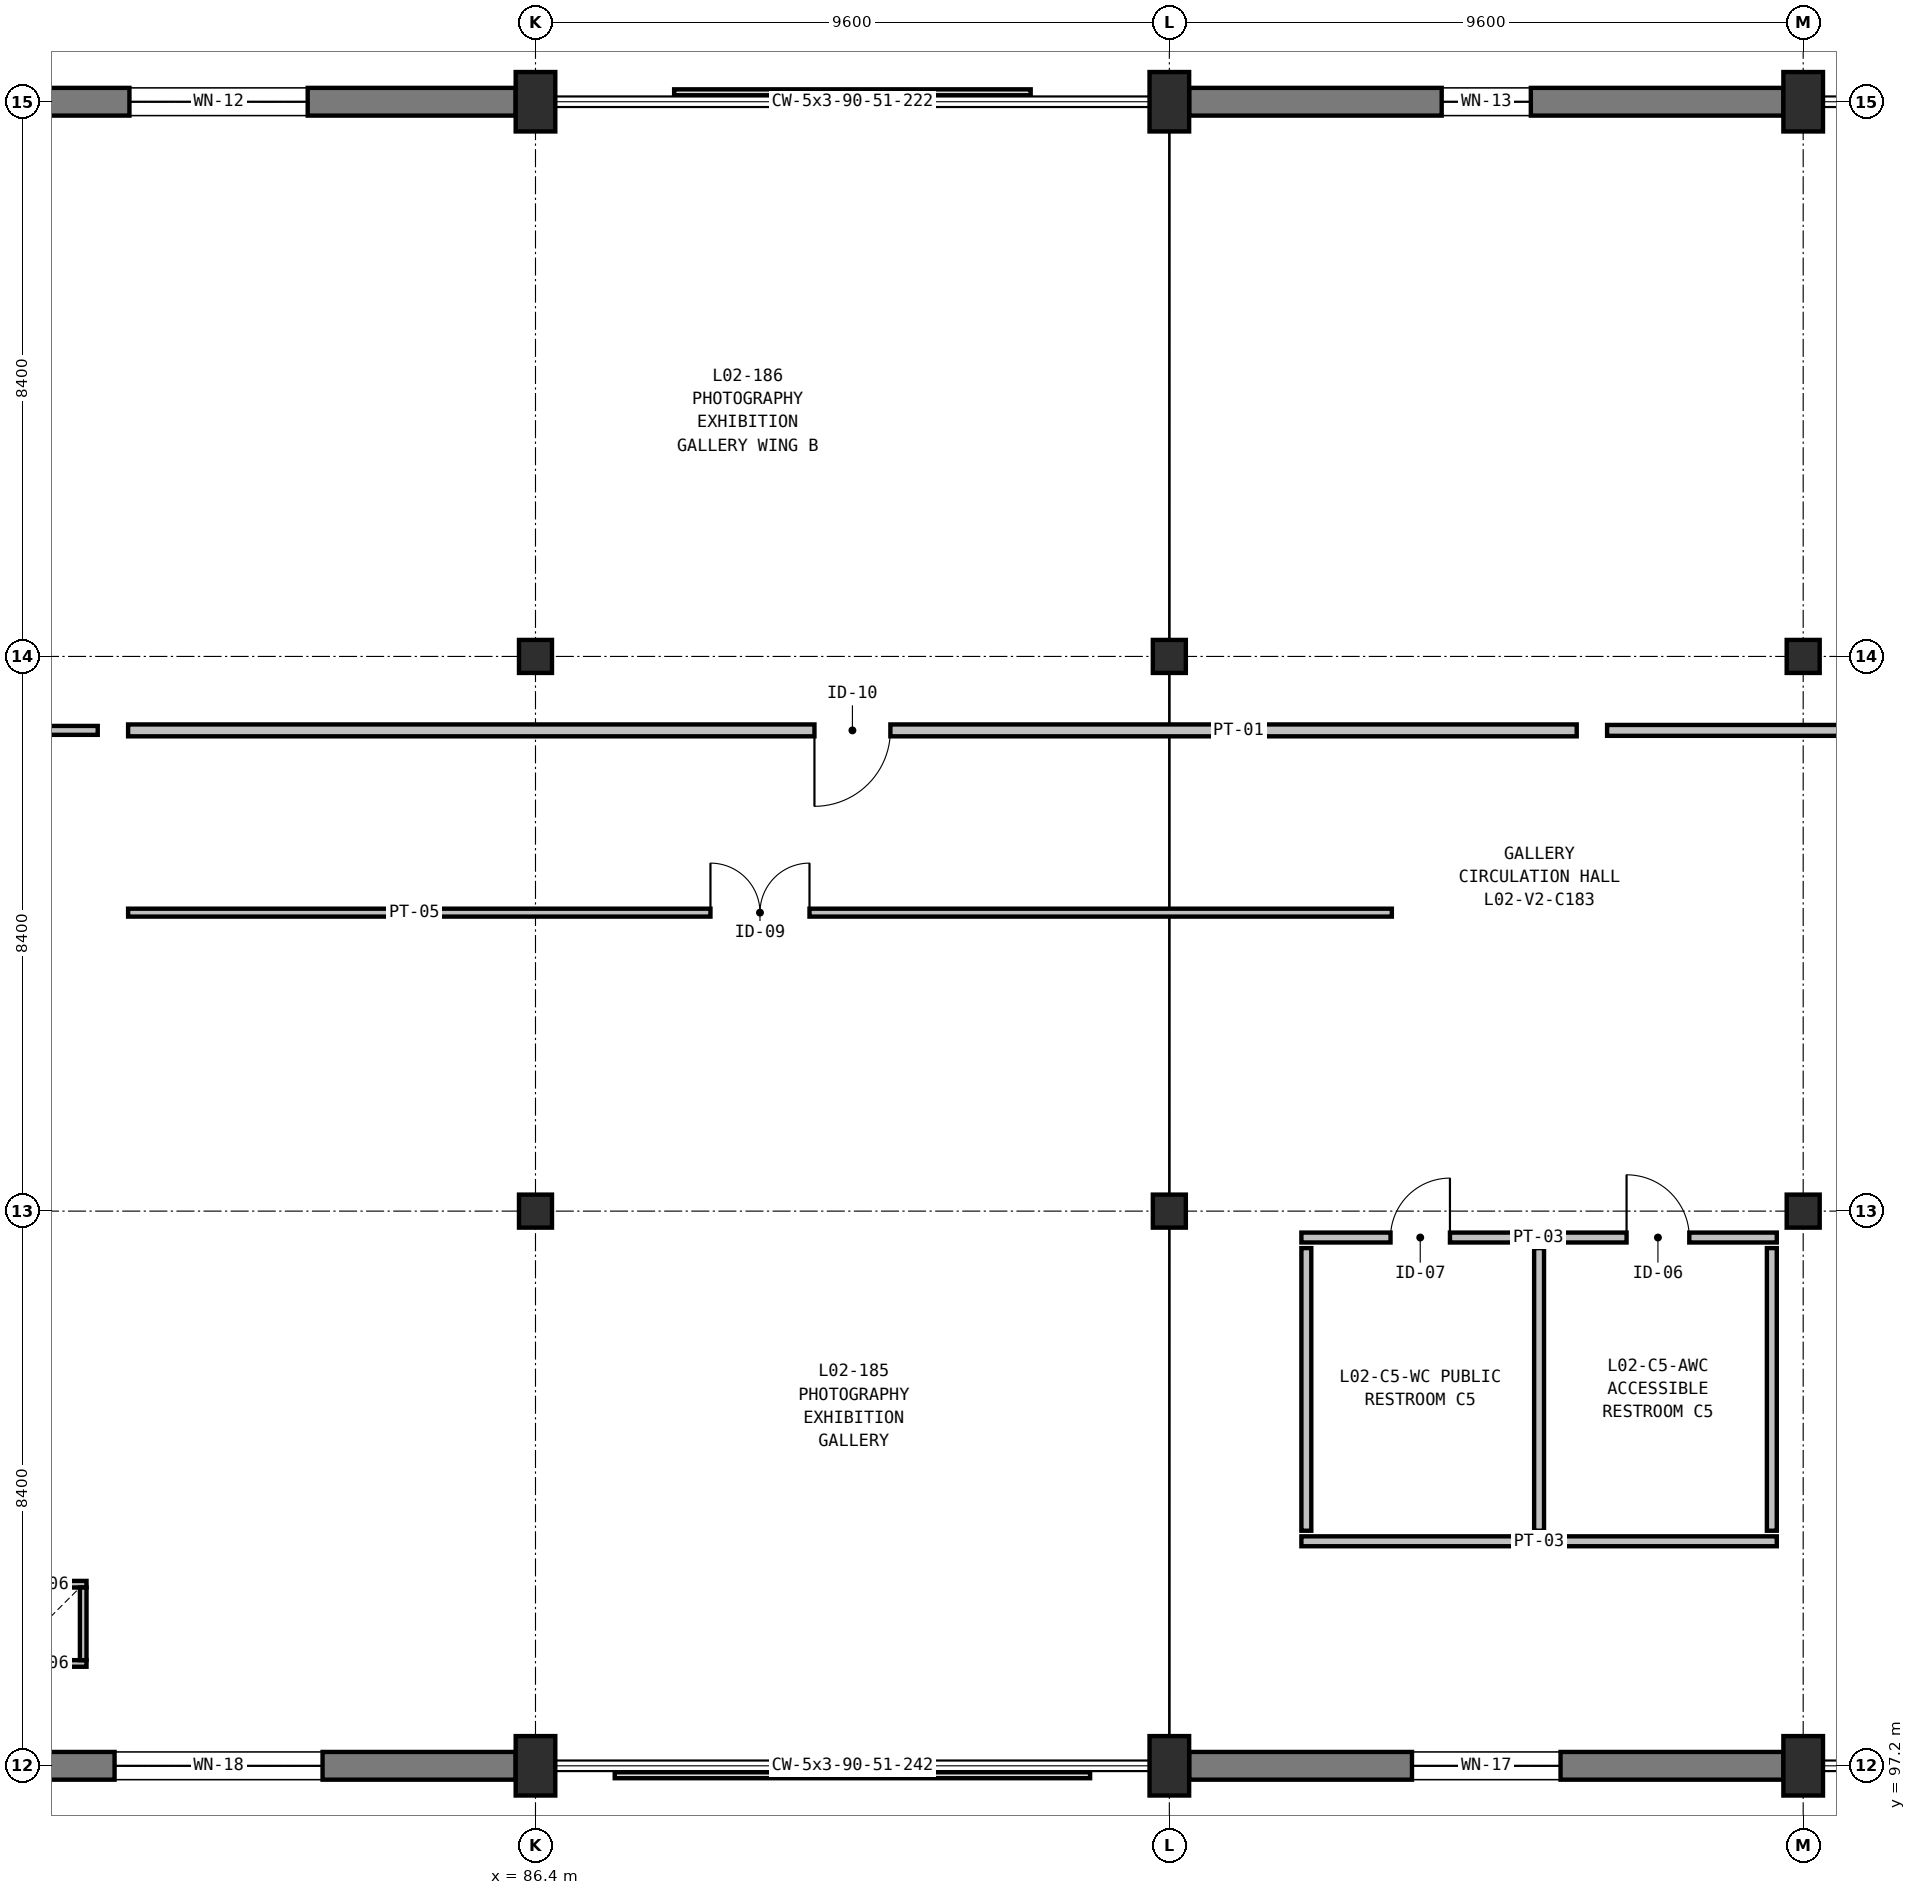
"""IFC4 building model, lengths in metres.
Left out: names, types, materials, properties, quantities, classifications, styles, units other than length and angle.
Written with IfcOpenShell. Run it as: python <this file> out.ifc"""

import sys

from ifc_helpers import new_model, si_unit, direction, frame, frame_2d, origin, origin_2d, place, context, subcontext, project, spatial, rectangle, extrude, element, fill, save


model = new_model("IFC4")
c1 = context("Model", 3, precision=1e-05, world=origin(), true_north=direction((0.0, 1.0)))
c2 = subcontext(c1, "Body", "Model", "MODEL_VIEW")
j1 = project(units=[si_unit("LENGTHUNIT", "METRE"), si_unit("PLANEANGLEUNIT", "RADIAN")], contexts=[c1])
p1 = place(None, origin())
s1 = spatial("IfcSite", under=j1, at=p1, CompositionType="ELEMENT")
p2 = place(p1, origin())
s2 = spatial("IfcBuilding", under=s1, at=p2, CompositionType="ELEMENT")
p3 = place(p2, frame((0.0, 0.0, 11.4)))
s3 = spatial("IfcBuildingStorey", under=s2, at=p3, CompositionType="ELEMENT", Elevation=11.4)
p4 = place(p3, frame((86.4, 97.2, 0.0), z_axis=(0.0, 0.0, 1.0), x_axis=(1.0, 0.0, 0.0)))
e1 = element("IfcColumn", 1, at=p4, inside=s3, PredefinedType="COLUMN", context=c2, shape_type="SweptSolid", body=[
    extrude(rectangle(XDim=0.6, YDim=0.9, at=origin_2d()), origin(), (0.0, 0.0, 1.0), 5.4),
])
for number, where, z_axis, x_axis in (
    (2, (86.4, 105.6, 0.0), (0.0, 0.0, 1.0), (1.0, 0.0, 0.0)),
    (3, (86.4, 114.0, 0.0), (0.0, 0.0, 1.0), (1.0, 0.0, 0.0)),
):
    element("IfcColumn", number, at=place(p3, frame(where, z_axis=z_axis, x_axis=x_axis)), inside=s3, PredefinedType="COLUMN", context=c2, shape_type="SweptSolid", body=[
        extrude(rectangle(XDim=0.5, YDim=0.5, at=origin_2d()), origin(), (0.0, 0.0, 1.0), 5.4),
    ])
for number, where, z_axis, x_axis in (
    (4, (86.4, 122.4, 0.0), (0.0, 0.0, 1.0), (1.0, 0.0, 0.0)),
    (5, (96.0, 97.2, 0.0), (0.0, 0.0, 1.0), (1.0, 0.0, 0.0)),
):
    element("IfcColumn", number, at=place(p3, frame(where, z_axis=z_axis, x_axis=x_axis)), inside=s3, PredefinedType="COLUMN", context=c2, shape_type="SweptSolid", body=[
        extrude(rectangle(XDim=0.6, YDim=0.9, at=origin_2d()), origin(), (0.0, 0.0, 1.0), 5.4),
    ])
for number, where, z_axis, x_axis in (
    (6, (96.0, 105.6, 0.0), (0.0, 0.0, 1.0), (1.0, 0.0, 0.0)),
    (7, (96.0, 114.0, 0.0), (0.0, 0.0, 1.0), (1.0, 0.0, 0.0)),
):
    element("IfcColumn", number, at=place(p3, frame(where, z_axis=z_axis, x_axis=x_axis)), inside=s3, PredefinedType="COLUMN", context=c2, shape_type="SweptSolid", body=[
        extrude(rectangle(XDim=0.5, YDim=0.5, at=origin_2d()), origin(), (0.0, 0.0, 1.0), 5.4),
    ])
for number, where, z_axis, x_axis in (
    (8, (96.0, 122.4, 0.0), (0.0, 0.0, 1.0), (1.0, 0.0, 0.0)),
    (9, (105.6, 97.2, 0.0), (0.0, 0.0, 1.0), (1.0, 0.0, 0.0)),
):
    element("IfcColumn", number, at=place(p3, frame(where, z_axis=z_axis, x_axis=x_axis)), inside=s3, PredefinedType="COLUMN", context=c2, shape_type="SweptSolid", body=[
        extrude(rectangle(XDim=0.6, YDim=0.9, at=origin_2d()), origin(), (0.0, 0.0, 1.0), 5.4),
    ])
for number, where, z_axis, x_axis in (
    (10, (105.6, 105.6, 0.0), (0.0, 0.0, 1.0), (1.0, 0.0, 0.0)),
    (11, (105.6, 114.0, 0.0), (0.0, 0.0, 1.0), (1.0, 0.0, 0.0)),
):
    element("IfcColumn", number, at=place(p3, frame(where, z_axis=z_axis, x_axis=x_axis)), inside=s3, PredefinedType="COLUMN", context=c2, shape_type="SweptSolid", body=[
        extrude(rectangle(XDim=0.5, YDim=0.5, at=origin_2d()), origin(), (0.0, 0.0, 1.0), 5.4),
    ])
p5 = place(p3, frame((105.6, 122.4, 0.0), z_axis=(0.0, 0.0, 1.0), x_axis=(1.0, 0.0, 0.0)))
e12 = element("IfcColumn", 12, at=p5, inside=s3, PredefinedType="COLUMN", context=c2, shape_type="SweptSolid", body=[
    extrude(rectangle(XDim=0.6, YDim=0.9, at=origin_2d()), origin(), (0.0, 0.0, 1.0), 5.4),
])
p6 = place(p3, frame((77.1, 122.4, 0.0), z_axis=(0.0, 0.0, 1.0), x_axis=(1.0, 0.0, 0.0)))
e13 = element("IfcWall", 13, at=p6, inside=s3, PredefinedType="SOLIDWALL", context=c2, shape_type="SweptSolid", body=[
    extrude(rectangle(XDim=9.0, YDim=0.42, at=frame_2d((4.5, 0.0))), origin(), (0.0, 0.0, 1.0), 5.1),
])
p7 = place(p6, frame((3.15, 0.0, 0.9)))
e14 = element("IfcOpeningElement", 14, at=p7, cuts=e13, PredefinedType="OPENING", context=c2, shape_type="SweptSolid", body=[
    extrude(rectangle(XDim=2.7, YDim=1.8, at=frame_2d((1.35, 0.9))), frame((0.0, 0.22, 0.0), z_axis=(0.0, -1.0, 0.0), x_axis=(1.0, 0.0, 0.0)), (0.0, 0.0, 1.0), 0.44),
])
p8 = place(p3, frame((96.3, 122.4, 0.0), z_axis=(0.0, 0.0, 1.0), x_axis=(1.0, 0.0, 0.0)))
e15 = element("IfcWall", 15, at=p8, inside=s3, PredefinedType="SOLIDWALL", context=c2, shape_type="SweptSolid", body=[
    extrude(rectangle(XDim=9.0, YDim=0.42, at=frame_2d((4.5, 0.0))), origin(), (0.0, 0.0, 1.0), 5.1),
])
p9 = place(p8, frame((3.825, 0.0, 0.9)))
e16 = element("IfcOpeningElement", 16, at=p9, cuts=e15, PredefinedType="OPENING", context=c2, shape_type="SweptSolid", body=[
    extrude(rectangle(XDim=1.35, YDim=2.4, at=frame_2d((0.675, 1.2))), frame((0.0, 0.22, 0.0), z_axis=(0.0, -1.0, 0.0), x_axis=(1.0, 0.0, 0.0)), (0.0, 0.0, 1.0), 0.44),
])
p10 = place(p3, frame((105.3, 97.2, 0.0), z_axis=(0.0, 0.0, 1.0), x_axis=(-1.0, 0.0, 0.0)))
e17 = element("IfcWall", 17, at=p10, inside=s3, PredefinedType="SOLIDWALL", context=c2, shape_type="SweptSolid", body=[
    extrude(rectangle(XDim=9.0, YDim=0.42, at=frame_2d((4.5, 0.0))), origin(), (0.0, 0.0, 1.0), 5.1),
])
p11 = place(p10, frame((3.375, 0.0, 0.9)))
e18 = element("IfcOpeningElement", 18, at=p11, cuts=e17, PredefinedType="OPENING", context=c2, shape_type="SweptSolid", body=[
    extrude(rectangle(XDim=2.25, YDim=2.5, at=frame_2d((1.125, 1.25))), frame((0.0, 0.22, 0.0), z_axis=(0.0, -1.0, 0.0), x_axis=(1.0, 0.0, 0.0)), (0.0, 0.0, 1.0), 0.44),
])
p12 = place(p3, frame((86.1, 97.2, 0.0), z_axis=(0.0, 0.0, 1.0), x_axis=(-1.0, 0.0, 0.0)))
e19 = element("IfcWall", 19, at=p12, inside=s3, PredefinedType="SOLIDWALL", context=c2, shape_type="SweptSolid", body=[
    extrude(rectangle(XDim=9.0, YDim=0.42, at=frame_2d((4.5, 0.0))), origin(), (0.0, 0.0, 1.0), 5.1),
])
p13 = place(p12, frame((2.925, 0.0, 0.9)))
e20 = element("IfcOpeningElement", 20, at=p13, cuts=e19, PredefinedType="OPENING", context=c2, shape_type="SweptSolid", body=[
    extrude(rectangle(XDim=3.15, YDim=2.5, at=frame_2d((1.575, 1.25))), frame((0.0, 0.22, 0.0), z_axis=(0.0, -1.0, 0.0), x_axis=(1.0, 0.0, 0.0)), (0.0, 0.0, 1.0), 0.44),
])
p14 = place(p3, frame((98.0, 105.2, 0.0), z_axis=(0.0, 0.0, 1.0), x_axis=(1.0, 0.0, 0.0)))
e21 = element("IfcWall", 21, at=p14, inside=s3, PredefinedType="PARTITIONING", context=c2, shape_type="SweptSolid", body=[
    extrude(rectangle(XDim=7.2, YDim=0.15, at=frame_2d((3.6, 0.0))), origin(), (0.0, 0.0, 1.0), 5.1),
])
p15 = place(p14, frame((1.35, 0.0, 0.0)))
e22 = element("IfcOpeningElement", 22, at=p15, cuts=e21, PredefinedType="OPENING", context=c2, shape_type="SweptSolid", body=[
    extrude(rectangle(XDim=0.9, YDim=2.1, at=frame_2d((0.45, 1.05))), frame((0.0, 0.085, 0.0), z_axis=(0.0, -1.0, 0.0), x_axis=(1.0, 0.0, 0.0)), (0.0, 0.0, 1.0), 0.17),
])
p16 = place(p14, frame((4.925, 0.0, 0.0)))
e23 = element("IfcOpeningElement", 23, at=p16, cuts=e21, PredefinedType="OPENING", context=c2, shape_type="SweptSolid", body=[
    extrude(rectangle(XDim=0.95, YDim=2.15, at=frame_2d((0.475, 1.075))), frame((0.0, 0.085, 0.0), z_axis=(0.0, -1.0, 0.0), x_axis=(1.0, 0.0, 0.0)), (0.0, 0.0, 1.0), 0.17),
])
p17 = place(p3, frame((98.0, 100.6, 0.0), z_axis=(0.0, 0.0, 1.0), x_axis=(1.0, 0.0, 0.0)))
e24 = element("IfcWall", 24, at=p17, inside=s3, PredefinedType="PARTITIONING", context=c2, shape_type="SweptSolid", body=[
    extrude(rectangle(XDim=7.2, YDim=0.15, at=frame_2d((3.6, 0.0))), origin(), (0.0, 0.0, 1.0), 5.1),
])
for number, where, z_axis, x_axis in (
    (25, (98.075, 100.76, 0.0), (0.0, 0.0, 1.0), (0.0, 1.0, 0.0)),
    (26, (101.6, 100.76, 0.0), (0.0, 0.0, 1.0), (0.0, 1.0, 0.0)),
    (27, (105.125, 100.76, 0.0), (0.0, 0.0, 1.0), (0.0, 1.0, 0.0)),
):
    element("IfcWall", number, at=place(p3, frame(where, z_axis=z_axis, x_axis=x_axis)), inside=s3, PredefinedType="PARTITIONING", context=c2, shape_type="SweptSolid", body=[
        extrude(rectangle(XDim=4.28, YDim=0.15, at=frame_2d((2.14, 0.0))), origin(), (0.0, 0.0, 1.0), 4.475),
    ])
for number, where, z_axis, x_axis in (
    (28, (78.3, 99.95, 0.0), (0.0, 0.0, 1.0), (1.0, 0.0, 0.0)),
    (29, (79.6, 98.75, 0.0), (0.0, 0.0, 1.0), (-1.0, 0.0, 0.0)),
):
    element("IfcWall", number, at=place(p3, frame(where, z_axis=z_axis, x_axis=x_axis)), inside=s3, PredefinedType="PARTITIONING", context=c2, shape_type="SweptSolid", body=[
        extrude(rectangle(XDim=1.3, YDim=0.1, at=frame_2d((0.65, 0.0))), origin(), (0.0, 0.0, 1.0), 5.1),
    ])
p18 = place(p3, frame((79.55, 99.9, 0.0), z_axis=(0.0, 0.0, 1.0), x_axis=(0.0, -1.0, 0.0)))
e30 = element("IfcWall", 30, at=p18, inside=s3, PredefinedType="PARTITIONING", context=c2, shape_type="SweptSolid", body=[
    extrude(rectangle(XDim=1.1, YDim=0.1, at=frame_2d((0.55, 0.0))), origin(), (0.0, 0.0, 1.0), 5.1),
])
p19 = place(p3, frame((79.77, 112.88, 0.0), z_axis=(0.0, 0.0, 1.0), x_axis=(-1.0, 0.0, 0.0)))
e31 = element("IfcWall", 31, at=p19, inside=s3, PredefinedType="PARTITIONING", context=c2, shape_type="SweptSolid", body=[
    extrude(rectangle(XDim=21.62, YDim=0.135, at=frame_2d((10.81, 0.0))), origin(), (0.0, 0.0, 1.0), 4.375),
])
p20 = place(p19, frame((8.61, 0.0, 0.0)))
e32 = element("IfcOpeningElement", 32, at=p20, cuts=e31, PredefinedType="OPENING", context=c2, shape_type="SweptSolid", body=[
    extrude(rectangle(XDim=2.4, YDim=2.6, at=frame_2d((1.2, 1.3))), frame((0.0, 0.077, 0.0), z_axis=(0.0, -1.0, 0.0), x_axis=(1.0, 0.0, 0.0)), (0.0, 0.0, 1.0), 0.155),
])
p21 = place(p3, frame((80.23, 110.12, 0.0), z_axis=(0.0, 0.0, 1.0), x_axis=(1.0, 0.0, 0.0)))
e33 = element("IfcWall", 33, at=p21, inside=s3, PredefinedType="PARTITIONING", context=c2, shape_type="SweptSolid", body=[
    extrude(rectangle(XDim=19.14, YDim=0.12, at=frame_2d((9.57, 0.0))), origin(), (0.0, 0.0, 1.0), 4.375),
])
p22 = place(p21, frame((8.82, 0.0, 0.0)))
e34 = element("IfcOpeningElement", 34, at=p22, cuts=e33, PredefinedType="OPENING", context=c2, shape_type="SweptSolid", body=[
    extrude(rectangle(XDim=1.5, YDim=2.3, at=frame_2d((0.75, 1.15))), frame((0.0, 0.07, 0.0), z_axis=(0.0, -1.0, 0.0), x_axis=(1.0, 0.0, 0.0)), (0.0, 0.0, 1.0), 0.14),
])
p23 = place(p3, frame((102.17, 112.88, 0.0), z_axis=(0.0, 0.0, 1.0), x_axis=(-1.0, 0.0, 0.0)))
e35 = element("IfcWall", 35, at=p23, inside=s3, PredefinedType="PARTITIONING", context=c2, shape_type="SweptSolid", body=[
    extrude(rectangle(XDim=21.94, YDim=0.18, at=frame_2d((10.97, 0.0))), origin(), (0.0, 0.0, 1.0), 4.375),
])
p24 = place(p23, frame((10.395, 0.0, 0.0)))
e36 = element("IfcOpeningElement", 36, at=p24, cuts=e35, PredefinedType="OPENING", context=c2, shape_type="SweptSolid", body=[
    extrude(rectangle(XDim=1.15, YDim=2.2, at=frame_2d((0.575, 1.1))), frame((0.0, 0.1, 0.0), z_axis=(0.0, -1.0, 0.0), x_axis=(1.0, 0.0, 0.0)), (0.0, 0.0, 1.0), 0.2),
])
p25 = place(p3, frame((124.25, 112.88, 0.0), z_axis=(0.0, 0.0, 1.0), x_axis=(-1.0, 0.0, 0.0)))
e37 = element("IfcWall", 37, at=p25, inside=s3, PredefinedType="PARTITIONING", context=c2, shape_type="SweptSolid", body=[
    extrude(rectangle(XDim=21.62, YDim=0.165, at=frame_2d((10.81, 0.0))), origin(), (0.0, 0.0, 1.0), 4.375),
])
p26 = place(p25, frame((10.41, 0.0, 0.0)))
e38 = element("IfcOpeningElement", 38, at=p26, cuts=e37, PredefinedType="OPENING", context=c2, shape_type="SweptSolid", body=[
    extrude(rectangle(XDim=1.8, YDim=2.4, at=frame_2d((0.9, 1.2))), frame((0.0, 0.093, 0.0), z_axis=(0.0, -1.0, 0.0), x_axis=(1.0, 0.0, 0.0)), (0.0, 0.0, 1.0), 0.185),
])
p27 = place(p7, origin())
e39 = element("IfcWindow", 39, at=p27, inside=s3, PartitioningType="SINGLE_PANEL", PredefinedType="WINDOW", context=c2, shape_type="SweptSolid", body=[
    extrude(rectangle(XDim=2.7, YDim=1.8, at=frame_2d((1.35, 0.9))), frame((0.0, 0.03, 0.0), z_axis=(0.0, -1.0, 0.0), x_axis=(1.0, 0.0, 0.0)), (0.0, 0.0, 1.0), 0.06),
])
fill(e14, e39)
p28 = place(p9, origin())
e40 = element("IfcWindow", 40, at=p28, inside=s3, PartitioningType="SINGLE_PANEL", PredefinedType="WINDOW", context=c2, shape_type="SweptSolid", body=[
    extrude(rectangle(XDim=1.35, YDim=2.4, at=frame_2d((0.675, 1.2))), frame((0.0, 0.03, 0.0), z_axis=(0.0, -1.0, 0.0), x_axis=(1.0, 0.0, 0.0)), (0.0, 0.0, 1.0), 0.06),
])
fill(e16, e40)
p29 = place(p11, origin())
e41 = element("IfcWindow", 41, at=p29, inside=s3, PartitioningType="SINGLE_PANEL", PredefinedType="WINDOW", context=c2, shape_type="SweptSolid", body=[
    extrude(rectangle(XDim=2.25, YDim=2.5, at=frame_2d((1.125, 1.25))), frame((0.0, 0.03, 0.0), z_axis=(0.0, -1.0, 0.0), x_axis=(1.0, 0.0, 0.0)), (0.0, 0.0, 1.0), 0.06),
])
fill(e18, e41)
p30 = place(p13, origin())
e42 = element("IfcWindow", 42, at=p30, inside=s3, PartitioningType="SINGLE_PANEL", PredefinedType="WINDOW", context=c2, shape_type="SweptSolid", body=[
    extrude(rectangle(XDim=3.15, YDim=2.5, at=frame_2d((1.575, 1.25))), frame((0.0, 0.03, 0.0), z_axis=(0.0, -1.0, 0.0), x_axis=(1.0, 0.0, 0.0)), (0.0, 0.0, 1.0), 0.06),
])
fill(e20, e42)
p31 = place(p15, origin())
e43 = element("IfcDoor", 43, at=p31, inside=s3, OperationType="SINGLE_SWING_RIGHT", PredefinedType="DOOR", context=c2, shape_type="SweptSolid", body=[
    extrude(rectangle(XDim=0.9, YDim=2.1, at=frame_2d((0.45, 1.05))), frame((0.0, 0.025, 0.0), z_axis=(0.0, -1.0, 0.0), x_axis=(1.0, 0.0, 0.0)), (0.0, 0.0, 1.0), 0.05),
])
fill(e22, e43)
p32 = place(p16, origin())
e44 = element("IfcDoor", 44, at=p32, inside=s3, OperationType="SINGLE_SWING_LEFT", PredefinedType="DOOR", context=c2, shape_type="SweptSolid", body=[
    extrude(rectangle(XDim=0.95, YDim=2.15, at=frame_2d((0.475, 1.075))), frame((0.0, 0.025, 0.0), z_axis=(0.0, -1.0, 0.0), x_axis=(1.0, 0.0, 0.0)), (0.0, 0.0, 1.0), 0.05),
])
fill(e23, e44)
p33 = place(p22, origin())
e45 = element("IfcDoor", 45, at=p33, inside=s3, OperationType="DOUBLE_DOOR_SINGLE_SWING", PredefinedType="DOOR", context=c2, shape_type="SweptSolid", body=[
    extrude(rectangle(XDim=1.5, YDim=2.3, at=frame_2d((0.75, 1.15))), frame((0.0, 0.025, 0.0), z_axis=(0.0, -1.0, 0.0), x_axis=(1.0, 0.0, 0.0)), (0.0, 0.0, 1.0), 0.05),
])
fill(e34, e45)
p34 = place(p24, origin())
e46 = element("IfcDoor", 46, at=p34, inside=s3, OperationType="SINGLE_SWING_RIGHT", PredefinedType="DOOR", context=c2, shape_type="SweptSolid", body=[
    extrude(rectangle(XDim=1.15, YDim=2.2, at=frame_2d((0.575, 1.1))), frame((0.0, 0.025, 0.0), z_axis=(0.0, -1.0, 0.0), x_axis=(1.0, 0.0, 0.0)), (0.0, 0.0, 1.0), 0.05),
])
fill(e36, e46)
save(model, sys.argv[1])
